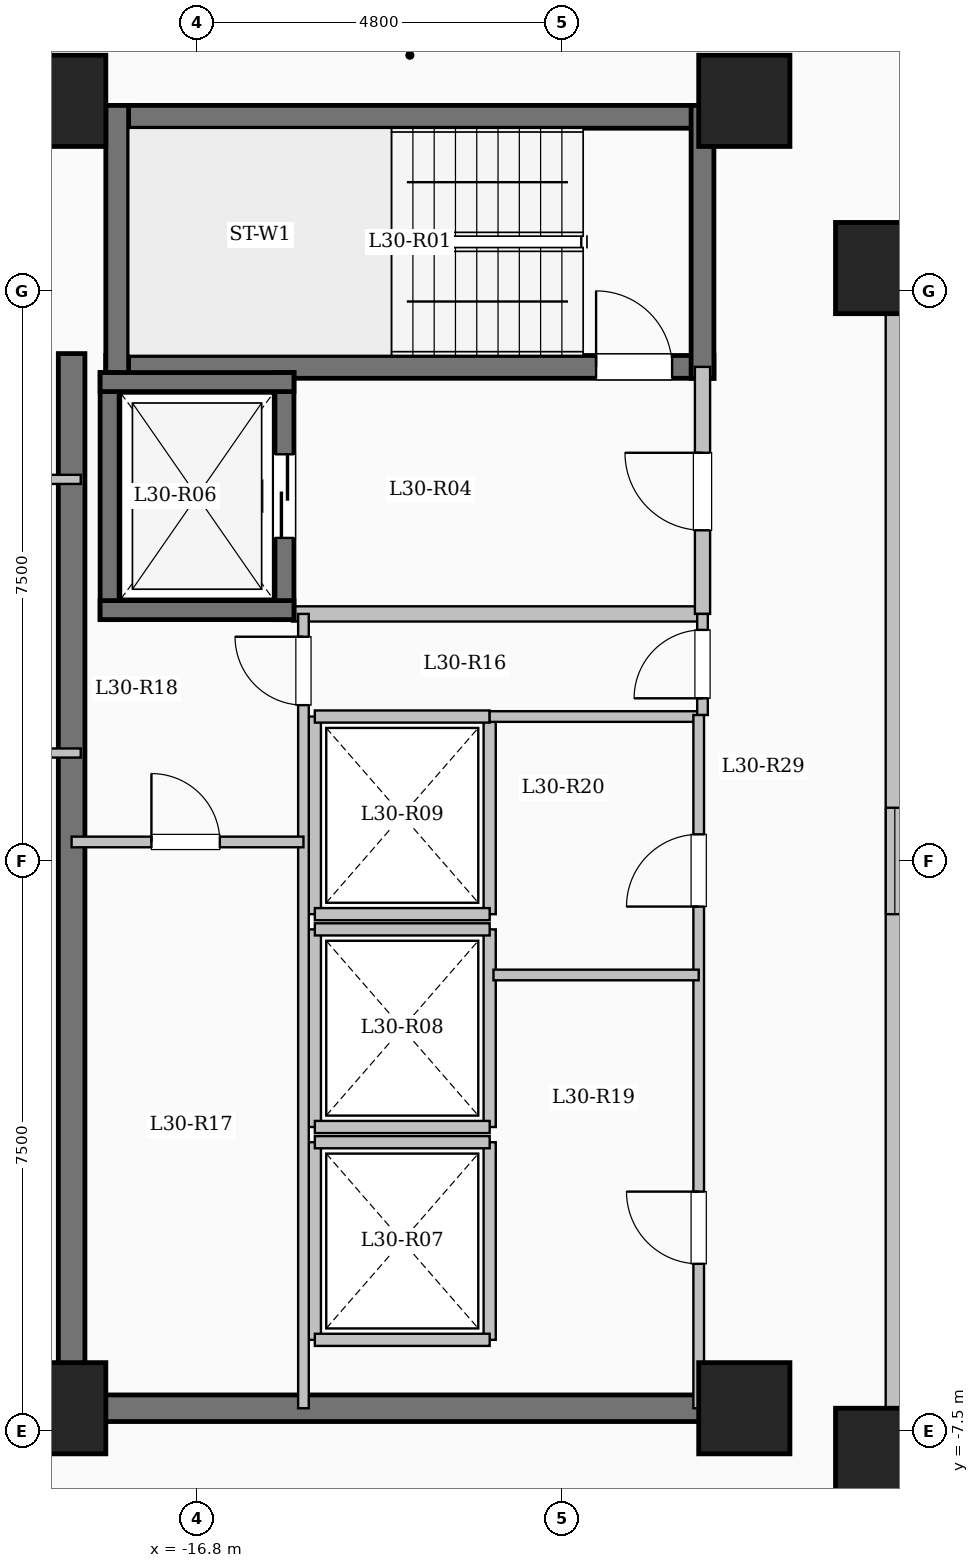
"""IFC4 building model, lengths in metres.
Left out: names, types, materials, properties, quantities, classifications, styles, units other than length and angle.
Written with IfcOpenShell. Run it as: python <this file> out.ifc"""

import sys

from ifc_helpers import new_model, si_unit, direction, frame, frame_2d, origin, origin_2d, place, context, subcontext, project, spatial, rectangle, extrude, element, fill, save


model = new_model("IFC4")
c1 = context("Model", 3, precision=1e-05, world=origin(), true_north=direction((0.0, 1.0)))
c2 = subcontext(c1, "Body", "Model", "MODEL_VIEW")
j1 = project(units=[si_unit("LENGTHUNIT", "METRE"), si_unit("PLANEANGLEUNIT", "RADIAN")], contexts=[c1])
p1 = place(None, origin())
s1 = spatial("IfcSite", under=j1, at=p1, CompositionType="ELEMENT")
p2 = place(p1, origin())
s2 = spatial("IfcBuilding", under=s1, at=p2, CompositionType="ELEMENT")
p3 = place(p2, frame((0.0, 0.0, 111.8)))
s3 = spatial("IfcBuildingStorey", under=s2, at=p3, CompositionType="ELEMENT", Elevation=111.8)
for number, where, z_axis, x_axis in (
    (1, (-7.8, -7.8, 0.0), (0.0, 0.0, 1.0), (1.0, 0.0, 0.0)),
    (2, (-7.8, 7.8, 0.0), (0.0, 0.0, 1.0), (1.0, 0.0, 0.0)),
    (3, (-9.6, -7.2, 0.0), (0.0, 0.0, 1.0), (1.0, 0.0, 0.0)),
    (4, (-9.6, 10.0, 0.0), (0.0, 0.0, 1.0), (1.0, 0.0, 0.0)),
    (5, (-18.6, -7.2, 0.0), (0.0, 0.0, 1.0), (1.0, 0.0, 0.0)),
    (6, (-18.6, 10.0, 0.0), (0.0, 0.0, 1.0), (1.0, 0.0, 0.0)),
):
    element("IfcColumn", number, at=place(p3, frame(where, z_axis=z_axis, x_axis=x_axis)), inside=s3, PredefinedType="COLUMN", context=c2, shape_type="SweptSolid", body=[
        extrude(rectangle(XDim=1.2, YDim=1.2, at=origin_2d()), origin(), (0.0, 0.0, 1.0), 3.35),
    ])
p4 = place(p3, frame((-7.62, -7.62, 0.0), z_axis=(0.0, 0.0, 1.0), x_axis=(1.0, 0.0, 0.0)))
e7 = element("IfcWall", 7, at=p4, inside=s3, PredefinedType="SOLIDWALL", context=c2, shape_type="SweptSolid", body=[
    extrude(rectangle(XDim=15.24, YDim=0.24, at=frame_2d((7.62, 0.0))), origin(), (0.0, 0.0, 1.0), 3.1),
])
p5 = place(p4, frame((6.92, 0.0, 0.95)))
e8 = element("IfcOpeningElement", 8, at=p5, cuts=e7, PredefinedType="OPENING", context=c2, shape_type="SweptSolid", body=[
    extrude(rectangle(XDim=1.4, YDim=1.5, at=frame_2d((0.7, 0.75))), frame((0.0, 0.13, 0.0), z_axis=(0.0, -1.0, 0.0), x_axis=(1.0, 0.0, 0.0)), (0.0, 0.0, 1.0), 0.26),
])
p6 = place(p3, frame((7.62, 7.62, 0.0), z_axis=(0.0, 0.0, 1.0), x_axis=(-1.0, 0.0, 0.0)))
e9 = element("IfcWall", 9, at=p6, inside=s3, PredefinedType="SOLIDWALL", context=c2, shape_type="SweptSolid", body=[
    extrude(rectangle(XDim=15.24, YDim=0.24, at=frame_2d((7.62, 0.0))), origin(), (0.0, 0.0, 1.0), 3.1),
])
p7 = place(p6, frame((6.92, 0.0, 0.95)))
e10 = element("IfcOpeningElement", 10, at=p7, cuts=e9, PredefinedType="OPENING", context=c2, shape_type="SweptSolid", body=[
    extrude(rectangle(XDim=1.4, YDim=1.5, at=frame_2d((0.7, 0.75))), frame((0.0, 0.13, 0.0), z_axis=(0.0, -1.0, 0.0), x_axis=(1.0, 0.0, 0.0)), (0.0, 0.0, 1.0), 0.26),
])
p8 = place(p3, frame((-7.62, 7.62, 0.0), z_axis=(0.0, 0.0, 1.0), x_axis=(0.0, -1.0, 0.0)))
e11 = element("IfcWall", 11, at=p8, inside=s3, PredefinedType="SOLIDWALL", context=c2, shape_type="SweptSolid", body=[
    extrude(rectangle(XDim=15.24, YDim=0.24, at=frame_2d((7.62, 0.0))), origin(), (0.0, 0.0, 1.0), 3.1),
])
p9 = place(p8, frame((6.92, 0.0, 0.95)))
e12 = element("IfcOpeningElement", 12, at=p9, cuts=e11, PredefinedType="OPENING", context=c2, shape_type="SweptSolid", body=[
    extrude(rectangle(XDim=1.4, YDim=1.5, at=frame_2d((0.7, 0.75))), frame((0.0, 0.13, 0.0), z_axis=(0.0, -1.0, 0.0), x_axis=(1.0, 0.0, 0.0)), (0.0, 0.0, 1.0), 0.26),
])
p10 = place(p3, frame((-18.0, 9.79, 0.0), z_axis=(0.0, 0.0, 1.0), x_axis=(1.0, 0.0, 0.0)))
e13 = element("IfcWall", 13, at=p10, inside=s3, PredefinedType="SHEAR", context=c2, shape_type="SweptSolid", body=[
    extrude(rectangle(XDim=8.0, YDim=0.3, at=frame_2d((4.0, 0.0))), origin(), (0.0, 0.0, 1.0), 3.35),
])
p11 = place(p3, frame((-18.0, 6.5, 0.0), z_axis=(0.0, 0.0, 1.0), x_axis=(1.0, 0.0, 0.0)))
e14 = element("IfcWall", 14, at=p11, inside=s3, PredefinedType="SHEAR", context=c2, shape_type="SweptSolid", body=[
    extrude(rectangle(XDim=8.0, YDim=0.3, at=frame_2d((4.0, 0.0))), origin(), (0.0, 0.0, 1.0), 3.35),
])
p12 = place(p11, frame((6.45, 0.0, 0.0)))
e15 = element("IfcOpeningElement", 15, at=p12, cuts=e14, PredefinedType="OPENING", context=c2, shape_type="SweptSolid", body=[
    extrude(rectangle(XDim=1.0, YDim=2.15, at=frame_2d((0.5, 1.075))), frame((0.0, 0.16, 0.0), z_axis=(0.0, -1.0, 0.0), x_axis=(1.0, 0.0, 0.0)), (0.0, 0.0, 1.0), 0.32),
])
for number, where, z_axis, x_axis in (
    (16, (-17.85, 6.35, 0.0), (0.0, 0.0, 1.0), (0.0, 1.0, 0.0)),
    (17, (-10.15, 6.35, 0.0), (0.0, 0.0, 1.0), (0.0, 1.0, 0.0)),
):
    element("IfcWall", number, at=place(p3, frame(where, z_axis=z_axis, x_axis=x_axis)), inside=s3, PredefinedType="SHEAR", context=c2, shape_type="SweptSolid", body=[
        extrude(rectangle(XDim=3.59, YDim=0.3, at=frame_2d((1.795, 0.0))), origin(), (0.0, 0.0, 1.0), 3.35),
    ])
p13 = place(p3, frame((-15.55, 3.25, 0.0), z_axis=(0.0, 0.0, 1.0), x_axis=(1.0, 0.0, 0.0)))
e18 = element("IfcWall", 18, at=p13, inside=s3, PredefinedType="SOLIDWALL", context=c2, shape_type="SweptSolid", body=[
    extrude(rectangle(XDim=5.4, YDim=0.2, at=frame_2d((2.7, 0.0))), origin(), (0.0, 0.0, 1.0), 3.1),
])
p14 = place(p3, frame((-10.15, 3.25, 0.0), z_axis=(0.0, 0.0, 1.0), x_axis=(0.0, 1.0, 0.0)))
e19 = element("IfcWall", 19, at=p14, inside=s3, PredefinedType="SOLIDWALL", context=c2, shape_type="SweptSolid", body=[
    extrude(rectangle(XDim=3.25, YDim=0.2, at=frame_2d((1.625, 0.0))), origin(), (0.0, 0.0, 1.0), 3.1),
])
p15 = place(p14, frame((1.1, 0.0, 0.0)))
e20 = element("IfcOpeningElement", 20, at=p15, cuts=e19, PredefinedType="OPENING", context=c2, shape_type="SweptSolid", body=[
    extrude(rectangle(XDim=1.02, YDim=2.15, at=frame_2d((0.51, 1.075))), frame((0.0, 0.11, 0.0), z_axis=(0.0, -1.0, 0.0), x_axis=(1.0, 0.0, 0.0)), (0.0, 0.0, 1.0), 0.22),
])
p16 = place(p3, frame((-17.95, 3.175, 0.0), z_axis=(0.0, 0.0, 1.0), x_axis=(0.0, 1.0, 0.0)))
e21 = element("IfcWall", 21, at=p16, inside=s3, PredefinedType="SHEAR", context=c2, shape_type="SweptSolid", body=[
    extrude(rectangle(XDim=3.25, YDim=0.25, at=frame_2d((1.625, 0.0))), origin(), (0.0, 0.0, 1.0), 3.35),
])
p17 = place(p3, frame((-15.65, 3.175, 0.0), z_axis=(0.0, 0.0, 1.0), x_axis=(0.0, 1.0, 0.0)))
e22 = element("IfcWall", 22, at=p17, inside=s3, PredefinedType="SHEAR", context=c2, shape_type="SweptSolid", body=[
    extrude(rectangle(XDim=3.25, YDim=0.25, at=frame_2d((1.625, 0.0))), origin(), (0.0, 0.0, 1.0), 3.35),
])
p18 = place(p17, frame((1.075, 0.0, 0.0)))
e23 = element("IfcOpeningElement", 23, at=p18, cuts=e22, PredefinedType="OPENING", context=c2, shape_type="SweptSolid", body=[
    extrude(rectangle(XDim=1.1, YDim=2.15, at=frame_2d((0.55, 1.075))), frame((0.0, 0.135, 0.0), z_axis=(0.0, -1.0, 0.0), x_axis=(1.0, 0.0, 0.0)), (0.0, 0.0, 1.0), 0.27),
])
for number, where, z_axis, x_axis in (
    (24, (-18.075, 3.3, 0.0), (0.0, 0.0, 1.0), (1.0, 0.0, 0.0)),
    (25, (-18.075, 6.3, 0.0), (0.0, 0.0, 1.0), (1.0, 0.0, 0.0)),
):
    element("IfcWall", number, at=place(p3, frame(where, z_axis=z_axis, x_axis=x_axis)), inside=s3, PredefinedType="SHEAR", context=c2, shape_type="SweptSolid", body=[
        extrude(rectangle(XDim=2.55, YDim=0.25, at=frame_2d((1.275, 0.0))), origin(), (0.0, 0.0, 1.0), 3.35),
    ])
for number, where, z_axis, x_axis in (
    (26, (-15.25, -6.3, 0.0), (0.0, 0.0, 1.0), (0.0, 1.0, 0.0)),
    (27, (-12.95, -6.3, 0.0), (0.0, 0.0, 1.0), (0.0, 1.0, 0.0)),
):
    element("IfcWall", number, at=place(p3, frame(where, z_axis=z_axis, x_axis=x_axis)), inside=s3, PredefinedType="SOLIDWALL", context=c2, shape_type="SweptSolid", body=[
        extrude(rectangle(XDim=2.6, YDim=0.16, at=frame_2d((1.3, 0.0))), origin(), (0.0, 0.0, 1.0), 3.1),
    ])
for number, where, z_axis, x_axis in (
    (28, (-15.25, -6.3, 0.0), (0.0, 0.0, 1.0), (1.0, 0.0, 0.0)),
    (29, (-15.25, -3.7, 0.0), (0.0, 0.0, 1.0), (1.0, 0.0, 0.0)),
):
    element("IfcWall", number, at=place(p3, frame(where, z_axis=z_axis, x_axis=x_axis)), inside=s3, PredefinedType="SOLIDWALL", context=c2, shape_type="SweptSolid", body=[
        extrude(rectangle(XDim=2.3, YDim=0.16, at=frame_2d((1.15, 0.0))), origin(), (0.0, 0.0, 1.0), 3.1),
    ])
for number, where, z_axis, x_axis in (
    (30, (-15.25, -3.5, 0.0), (0.0, 0.0, 1.0), (0.0, 1.0, 0.0)),
    (31, (-12.95, -3.5, 0.0), (0.0, 0.0, 1.0), (0.0, 1.0, 0.0)),
):
    element("IfcWall", number, at=place(p3, frame(where, z_axis=z_axis, x_axis=x_axis)), inside=s3, PredefinedType="SOLIDWALL", context=c2, shape_type="SweptSolid", body=[
        extrude(rectangle(XDim=2.6, YDim=0.16, at=frame_2d((1.3, 0.0))), origin(), (0.0, 0.0, 1.0), 3.1),
    ])
for number, where, z_axis, x_axis in (
    (32, (-15.25, -3.5, 0.0), (0.0, 0.0, 1.0), (1.0, 0.0, 0.0)),
    (33, (-15.25, -0.9, 0.0), (0.0, 0.0, 1.0), (1.0, 0.0, 0.0)),
):
    element("IfcWall", number, at=place(p3, frame(where, z_axis=z_axis, x_axis=x_axis)), inside=s3, PredefinedType="SOLIDWALL", context=c2, shape_type="SweptSolid", body=[
        extrude(rectangle(XDim=2.3, YDim=0.16, at=frame_2d((1.15, 0.0))), origin(), (0.0, 0.0, 1.0), 3.1),
    ])
for number, where, z_axis, x_axis in (
    (34, (-15.25, -0.7, 0.0), (0.0, 0.0, 1.0), (0.0, 1.0, 0.0)),
    (35, (-12.95, -0.7, 0.0), (0.0, 0.0, 1.0), (0.0, 1.0, 0.0)),
):
    element("IfcWall", number, at=place(p3, frame(where, z_axis=z_axis, x_axis=x_axis)), inside=s3, PredefinedType="SOLIDWALL", context=c2, shape_type="SweptSolid", body=[
        extrude(rectangle(XDim=2.6, YDim=0.16, at=frame_2d((1.3, 0.0))), origin(), (0.0, 0.0, 1.0), 3.1),
    ])
for number, where, z_axis, x_axis in (
    (36, (-15.25, -0.7, 0.0), (0.0, 0.0, 1.0), (1.0, 0.0, 0.0)),
    (37, (-15.25, 1.9, 0.0), (0.0, 0.0, 1.0), (1.0, 0.0, 0.0)),
):
    element("IfcWall", number, at=place(p3, frame(where, z_axis=z_axis, x_axis=x_axis)), inside=s3, PredefinedType="SOLIDWALL", context=c2, shape_type="SweptSolid", body=[
        extrude(rectangle(XDim=2.3, YDim=0.16, at=frame_2d((1.15, 0.0))), origin(), (0.0, 0.0, 1.0), 3.1),
    ])
p19 = place(p3, frame((-18.45, -7.375, 0.0), z_axis=(0.0, 0.0, 1.0), x_axis=(0.0, 1.0, 0.0)))
e38 = element("IfcWall", 38, at=p19, inside=s3, PredefinedType="SHEAR", context=c2, shape_type="SweptSolid", body=[
    extrude(rectangle(XDim=14.05, YDim=0.35, at=frame_2d((7.025, 0.0))), origin(), (0.0, 0.0, 1.0), 3.35),
])
p20 = place(p3, frame((-18.625, -7.2, 0.0), z_axis=(0.0, 0.0, 1.0), x_axis=(1.0, 0.0, 0.0)))
e39 = element("IfcWall", 39, at=p20, inside=s3, PredefinedType="SHEAR", context=c2, shape_type="SweptSolid", body=[
    extrude(rectangle(XDim=8.55, YDim=0.35, at=frame_2d((4.275, 0.0))), origin(), (0.0, 0.0, 1.0), 3.35),
])
p21 = place(p3, frame((-12.95, 1.9, 0.0), z_axis=(0.0, 0.0, 1.0), x_axis=(1.0, 0.0, 0.0)))
e40 = element("IfcWall", 40, at=p21, inside=s3, PredefinedType="PARTITIONING", context=c2, shape_type="SweptSolid", body=[
    extrude(rectangle(XDim=2.8, YDim=0.14, at=frame_2d((1.4, 0.0))), origin(), (0.0, 0.0, 1.0), 3.1),
])
p22 = place(p3, frame((-10.15, 1.92, 0.0), z_axis=(0.0, 0.0, 1.0), x_axis=(0.0, 1.0, 0.0)))
e41 = element("IfcWall", 41, at=p22, inside=s3, PredefinedType="PARTITIONING", context=c2, shape_type="SweptSolid", body=[
    extrude(rectangle(XDim=1.33, YDim=0.14, at=frame_2d((0.665, 0.0))), origin(), (0.0, 0.0, 1.0), 3.1),
])
p23 = place(p22, frame((0.22, 0.0, 0.0)))
e42 = element("IfcOpeningElement", 42, at=p23, cuts=e41, PredefinedType="OPENING", context=c2, shape_type="SweptSolid", body=[
    extrude(rectangle(XDim=0.9, YDim=2.08, at=frame_2d((0.45, 1.04))), frame((0.0, 0.08, 0.0), z_axis=(0.0, -1.0, 0.0), x_axis=(1.0, 0.0, 0.0)), (0.0, 0.0, 1.0), 0.16),
])
p24 = place(p3, frame((-15.4, -7.2, 0.0), z_axis=(0.0, 0.0, 1.0), x_axis=(0.0, 1.0, 0.0)))
e43 = element("IfcWall", 43, at=p24, inside=s3, PredefinedType="PARTITIONING", context=c2, shape_type="SweptSolid", body=[
    extrude(rectangle(XDim=10.45, YDim=0.14, at=frame_2d((5.225, 0.0))), origin(), (0.0, 0.0, 1.0), 3.1),
])
p25 = place(p24, frame((9.25, 0.0, 0.0)))
e44 = element("IfcOpeningElement", 44, at=p25, cuts=e43, PredefinedType="OPENING", context=c2, shape_type="SweptSolid", body=[
    extrude(rectangle(XDim=0.9, YDim=2.08, at=frame_2d((0.45, 1.04))), frame((0.0, 0.08, 0.0), z_axis=(0.0, -1.0, 0.0), x_axis=(1.0, 0.0, 0.0)), (0.0, 0.0, 1.0), 0.16),
])
p26 = place(p3, frame((-18.45, 0.25, 0.0), z_axis=(0.0, 0.0, 1.0), x_axis=(1.0, 0.0, 0.0)))
e45 = element("IfcWall", 45, at=p26, inside=s3, PredefinedType="PARTITIONING", context=c2, shape_type="SweptSolid", body=[
    extrude(rectangle(XDim=3.05, YDim=0.14, at=frame_2d((1.525, 0.0))), origin(), (0.0, 0.0, 1.0), 3.1),
])
p27 = place(p26, frame((1.05, 0.0, 0.0)))
e46 = element("IfcOpeningElement", 46, at=p27, cuts=e45, PredefinedType="OPENING", context=c2, shape_type="SweptSolid", body=[
    extrude(rectangle(XDim=0.9, YDim=2.08, at=frame_2d((0.45, 1.04))), frame((0.0, 0.08, 0.0), z_axis=(0.0, -1.0, 0.0), x_axis=(1.0, 0.0, 0.0)), (0.0, 0.0, 1.0), 0.16),
])
p28 = place(p3, frame((-10.2, -7.2, 0.0), z_axis=(0.0, 0.0, 1.0), x_axis=(0.0, 1.0, 0.0)))
e47 = element("IfcWall", 47, at=p28, inside=s3, PredefinedType="PARTITIONING", context=c2, shape_type="SweptSolid", body=[
    extrude(rectangle(XDim=9.12, YDim=0.14, at=frame_2d((4.56, 0.0))), origin(), (0.0, 0.0, 1.0), 3.1),
])
p29 = place(p28, frame((1.9, 0.0, 0.0)))
e48 = element("IfcOpeningElement", 48, at=p29, cuts=e47, PredefinedType="OPENING", context=c2, shape_type="SweptSolid", body=[
    extrude(rectangle(XDim=0.95, YDim=2.12, at=frame_2d((0.475, 1.06))), frame((0.0, 0.08, 0.0), z_axis=(0.0, -1.0, 0.0), x_axis=(1.0, 0.0, 0.0)), (0.0, 0.0, 1.0), 0.16),
])
p30 = place(p28, frame((6.6, 0.0, 0.0)))
e49 = element("IfcOpeningElement", 49, at=p30, cuts=e47, PredefinedType="OPENING", context=c2, shape_type="SweptSolid", body=[
    extrude(rectangle(XDim=0.95, YDim=2.12, at=frame_2d((0.475, 1.06))), frame((0.0, 0.08, 0.0), z_axis=(0.0, -1.0, 0.0), x_axis=(1.0, 0.0, 0.0)), (0.0, 0.0, 1.0), 0.16),
])
p31 = place(p3, frame((-12.9, -1.5, 0.0), z_axis=(0.0, 0.0, 1.0), x_axis=(1.0, 0.0, 0.0)))
e50 = element("IfcWall", 50, at=p31, inside=s3, PredefinedType="PARTITIONING", context=c2, shape_type="SweptSolid", body=[
    extrude(rectangle(XDim=2.7, YDim=0.14, at=frame_2d((1.35, 0.0))), origin(), (0.0, 0.0, 1.0), 3.1),
])
p32 = place(p3, frame((-26.88, -7.25, 0.0), z_axis=(0.0, 0.0, 1.0), x_axis=(1.0, 0.0, 0.0)))
e51 = element("IfcWall", 51, at=p32, inside=s3, PredefinedType="PARTITIONING", context=c2, shape_type="SweptSolid", body=[
    extrude(rectangle(XDim=8.43, YDim=0.15, at=frame_2d((4.215, 0.0))), origin(), (0.0, 0.0, 1.0), 3.1),
])
p33 = place(p32, frame((5.33, 0.0, 0.0)))
e52 = element("IfcOpeningElement", 52, at=p33, cuts=e51, PredefinedType="OPENING", context=c2, shape_type="SweptSolid", body=[
    extrude(rectangle(XDim=0.96, YDim=2.15, at=frame_2d((0.48, 1.075))), frame((0.0, 0.085, 0.0), z_axis=(0.0, -1.0, 0.0), x_axis=(1.0, 0.0, 0.0)), (0.0, 0.0, 1.0), 0.17),
])
p34 = place(p3, frame((-27.0, 1.42, 0.0), z_axis=(0.0, 0.0, 1.0), x_axis=(1.0, 0.0, 0.0)))
e53 = element("IfcWall", 53, at=p34, inside=s3, PredefinedType="PARTITIONING", context=c2, shape_type="SweptSolid", body=[
    extrude(rectangle(XDim=8.67, YDim=0.12, at=frame_2d((4.335, 0.0))), origin(), (0.0, 0.0, 1.0), 3.1),
])
p35 = place(p34, frame((1.763, 0.0, 0.0)))
e54 = element("IfcOpeningElement", 54, at=p35, cuts=e53, PredefinedType="OPENING", context=c2, shape_type="SweptSolid", body=[
    extrude(rectangle(XDim=0.88, YDim=2.1, at=frame_2d((0.44, 1.05))), frame((0.0, 0.07, 0.0), z_axis=(0.0, -1.0, 0.0), x_axis=(1.0, 0.0, 0.0)), (0.0, 0.0, 1.0), 0.14),
])
p36 = place(p34, frame((5.928, 0.0, 0.0)))
e55 = element("IfcOpeningElement", 55, at=p36, cuts=e53, PredefinedType="OPENING", context=c2, shape_type="SweptSolid", body=[
    extrude(rectangle(XDim=0.88, YDim=2.1, at=frame_2d((0.44, 1.05))), frame((0.0, 0.07, 0.0), z_axis=(0.0, -1.0, 0.0), x_axis=(1.0, 0.0, 0.0)), (0.0, 0.0, 1.0), 0.14),
])
p37 = place(p3, frame((-27.0, 5.02, 0.0), z_axis=(0.0, 0.0, 1.0), x_axis=(1.0, 0.0, 0.0)))
e56 = element("IfcWall", 56, at=p37, inside=s3, PredefinedType="PARTITIONING", context=c2, shape_type="SweptSolid", body=[
    extrude(rectangle(XDim=8.67, YDim=0.12, at=frame_2d((4.335, 0.0))), origin(), (0.0, 0.0, 1.0), 3.1),
])
p38 = place(p37, frame((7.1, 0.0, 0.0)))
e57 = element("IfcOpeningElement", 57, at=p38, cuts=e56, PredefinedType="OPENING", context=c2, shape_type="SweptSolid", body=[
    extrude(rectangle(XDim=0.88, YDim=2.1, at=frame_2d((0.44, 1.05))), frame((0.0, 0.07, 0.0), z_axis=(0.0, -1.0, 0.0), x_axis=(1.0, 0.0, 0.0)), (0.0, 0.0, 1.0), 0.14),
])
p39 = place(p9, origin())
e58 = element("IfcWindow", 58, at=p39, inside=s3, PartitioningType="SINGLE_PANEL", PredefinedType="WINDOW", context=c2, shape_type="SweptSolid", body=[
    extrude(rectangle(XDim=1.4, YDim=1.5, at=frame_2d((0.7, 0.75))), frame((0.0, 0.03, 0.0), z_axis=(0.0, -1.0, 0.0), x_axis=(1.0, 0.0, 0.0)), (0.0, 0.0, 1.0), 0.06),
])
fill(e12, e58)
p40 = place(p12, origin())
e59 = element("IfcDoor", 59, at=p40, inside=s3, OperationType="SINGLE_SWING_LEFT", PredefinedType="DOOR", context=c2, shape_type="SweptSolid", body=[
    extrude(rectangle(XDim=1.0, YDim=2.15, at=frame_2d((0.5, 1.075))), frame((0.0, 0.025, 0.0), z_axis=(0.0, -1.0, 0.0), x_axis=(1.0, 0.0, 0.0)), (0.0, 0.0, 1.0), 0.05),
])
fill(e15, e59)
p41 = place(p15, origin())
e60 = element("IfcDoor", 60, at=p41, inside=s3, OperationType="SINGLE_SWING_RIGHT", PredefinedType="DOOR", context=c2, shape_type="SweptSolid", body=[
    extrude(rectangle(XDim=1.02, YDim=2.15, at=frame_2d((0.51, 1.075))), frame((0.0, 0.025, 0.0), z_axis=(0.0, -1.0, 0.0), x_axis=(1.0, 0.0, 0.0)), (0.0, 0.0, 1.0), 0.05),
])
fill(e20, e60)
p42 = place(p18, origin())
e61 = element("IfcDoor", 61, at=p42, inside=s3, OperationType="SLIDING_TO_LEFT", PredefinedType="DOOR", context=c2, shape_type="SweptSolid", body=[
    extrude(rectangle(XDim=1.1, YDim=2.15, at=frame_2d((0.55, 1.075))), frame((0.0, 0.025, 0.0), z_axis=(0.0, -1.0, 0.0), x_axis=(1.0, 0.0, 0.0)), (0.0, 0.0, 1.0), 0.05),
])
fill(e23, e61)
p43 = place(p23, origin())
e62 = element("IfcDoor", 62, at=p43, inside=s3, OperationType="SINGLE_SWING_LEFT", PredefinedType="DOOR", context=c2, shape_type="SweptSolid", body=[
    extrude(rectangle(XDim=0.9, YDim=2.08, at=frame_2d((0.45, 1.04))), frame((0.0, 0.025, 0.0), z_axis=(0.0, -1.0, 0.0), x_axis=(1.0, 0.0, 0.0)), (0.0, 0.0, 1.0), 0.05),
])
fill(e42, e62)
p44 = place(p25, origin())
e63 = element("IfcDoor", 63, at=p44, inside=s3, OperationType="SINGLE_SWING_RIGHT", PredefinedType="DOOR", context=c2, shape_type="SweptSolid", body=[
    extrude(rectangle(XDim=0.9, YDim=2.08, at=frame_2d((0.45, 1.04))), frame((0.0, 0.025, 0.0), z_axis=(0.0, -1.0, 0.0), x_axis=(1.0, 0.0, 0.0)), (0.0, 0.0, 1.0), 0.05),
])
fill(e44, e63)
p45 = place(p27, origin())
e64 = element("IfcDoor", 64, at=p45, inside=s3, OperationType="SINGLE_SWING_LEFT", PredefinedType="DOOR", context=c2, shape_type="SweptSolid", body=[
    extrude(rectangle(XDim=0.9, YDim=2.08, at=frame_2d((0.45, 1.04))), frame((0.0, 0.025, 0.0), z_axis=(0.0, -1.0, 0.0), x_axis=(1.0, 0.0, 0.0)), (0.0, 0.0, 1.0), 0.05),
])
fill(e46, e64)
p46 = place(p29, origin())
e65 = element("IfcDoor", 65, at=p46, inside=s3, OperationType="SINGLE_SWING_RIGHT", PredefinedType="DOOR", context=c2, shape_type="SweptSolid", body=[
    extrude(rectangle(XDim=0.95, YDim=2.12, at=frame_2d((0.475, 1.06))), frame((0.0, 0.025, 0.0), z_axis=(0.0, -1.0, 0.0), x_axis=(1.0, 0.0, 0.0)), (0.0, 0.0, 1.0), 0.05),
])
fill(e48, e65)
p47 = place(p30, origin())
e66 = element("IfcDoor", 66, at=p47, inside=s3, OperationType="SINGLE_SWING_LEFT", PredefinedType="DOOR", context=c2, shape_type="SweptSolid", body=[
    extrude(rectangle(XDim=0.95, YDim=2.12, at=frame_2d((0.475, 1.06))), frame((0.0, 0.025, 0.0), z_axis=(0.0, -1.0, 0.0), x_axis=(1.0, 0.0, 0.0)), (0.0, 0.0, 1.0), 0.05),
])
fill(e49, e66)
save(model, sys.argv[1])
